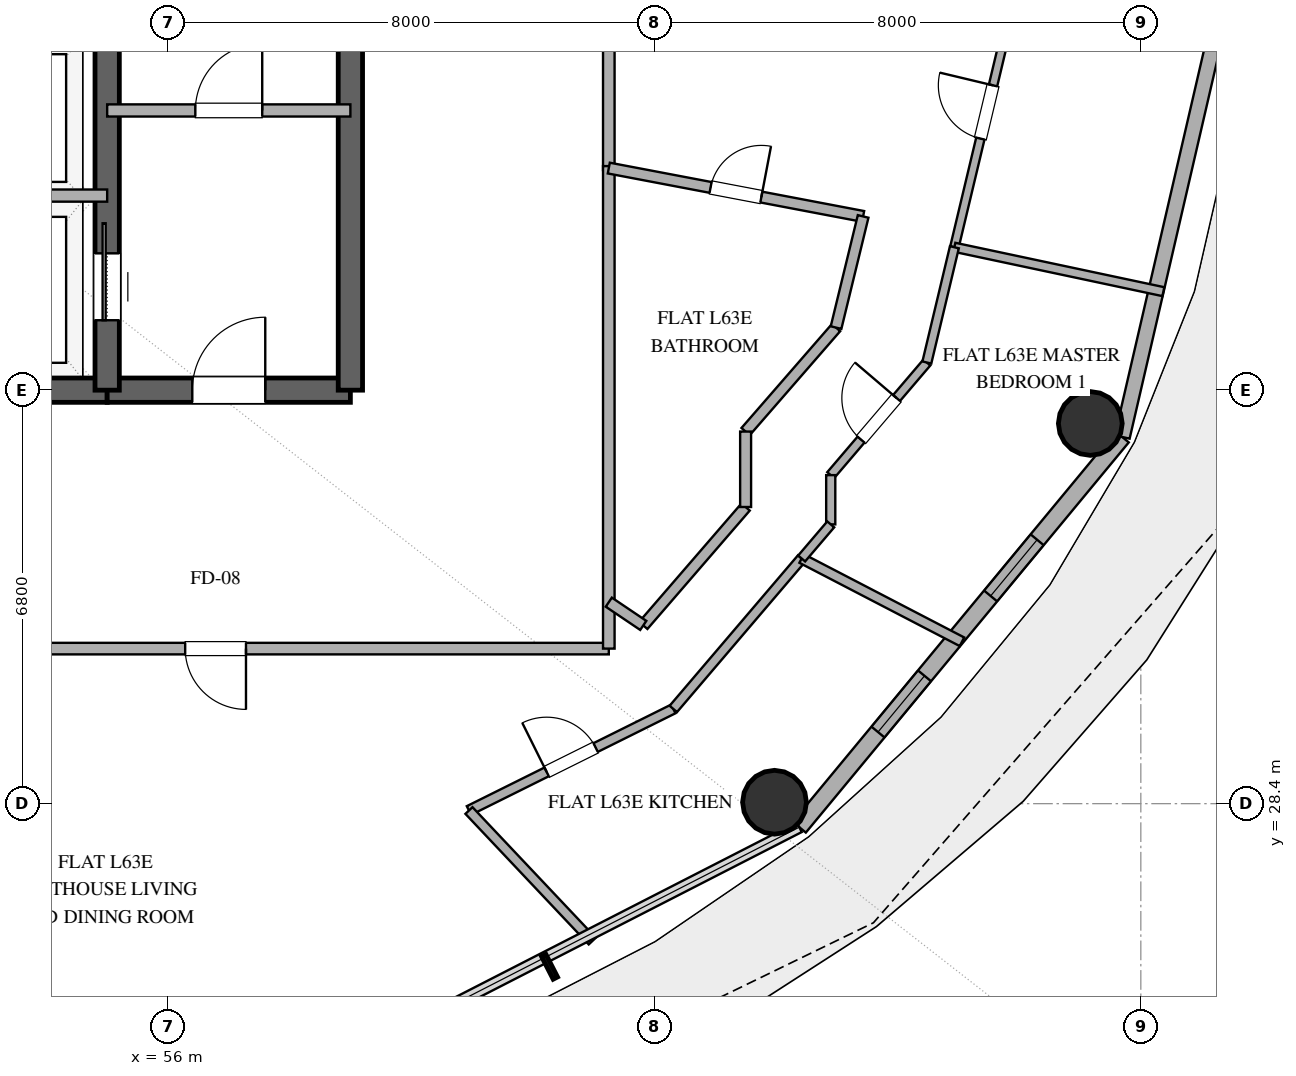
"""IFC4 building model, lengths in metres.
Left out: names, types, materials, properties, quantities, classifications, styles, units other than length and angle.
Written with IfcOpenShell. Run it as: python <this file> out.ifc"""

import sys

from ifc_helpers import new_model, si_unit, direction, frame, frame_2d, origin, origin_2d, place, context, subcontext, project, spatial, rectangle, hollow_circle, extrude, element, fill, save


model = new_model("IFC4")
c1 = context("Model", 3, precision=1e-05, world=origin(), true_north=direction((0.0, 1.0)))
c2 = subcontext(c1, "Body", "Model", "MODEL_VIEW")
j1 = project(units=[si_unit("LENGTHUNIT", "METRE"), si_unit("PLANEANGLEUNIT", "RADIAN")], contexts=[c1])
p1 = place(None, origin())
s1 = spatial("IfcSite", under=j1, at=p1, CompositionType="ELEMENT")
p2 = place(p1, origin())
s2 = spatial("IfcBuilding", under=s1, at=p2, CompositionType="ELEMENT")
p3 = place(p2, frame((0.0, 0.0, 246.0)))
s3 = spatial("IfcBuildingStorey", under=s2, at=p3, CompositionType="ELEMENT", Elevation=246.0)
p4 = place(p3, frame((41.0, 35.2, 0.0), z_axis=(0.0, 0.0, 1.0), x_axis=(1.0, 0.0, 0.0)))
e1 = element("IfcWall", 1, at=p4, inside=s3, PredefinedType="SHEAR", context=c2, shape_type="SweptSolid", body=[
    extrude(rectangle(XDim=14.0, YDim=0.4, at=frame_2d((7.0, 0.0))), origin(), (0.0, 0.0, 1.0), 3.36),
])
p5 = place(p4, frame((6.1, 0.0, 0.0)))
e2 = element("IfcOpeningElement", 2, at=p5, cuts=e1, PredefinedType="OPENING", context=c2, shape_type="SweptSolid", body=[
    extrude(rectangle(XDim=1.8, YDim=2.25, at=frame_2d((0.9, 1.125))), frame((0.0, 0.21, 0.0), z_axis=(0.0, -1.0, 0.0), x_axis=(1.0, 0.0, 0.0)), (0.0, 0.0, 1.0), 0.42),
])
p6 = place(p3, frame((55.0, 35.2, 0.0), z_axis=(0.0, 0.0, 1.0), x_axis=(1.0, 0.0, 0.0)))
e3 = element("IfcWall", 3, at=p6, inside=s3, PredefinedType="SHEAR", context=c2, shape_type="SweptSolid", body=[
    extrude(rectangle(XDim=4.0, YDim=0.4, at=frame_2d((2.0, 0.0))), origin(), (0.0, 0.0, 1.0), 3.36),
])
p7 = place(p6, frame((1.4, 0.0, 0.0)))
e4 = element("IfcOpeningElement", 4, at=p7, cuts=e3, PredefinedType="OPENING", context=c2, shape_type="SweptSolid", body=[
    extrude(rectangle(XDim=1.2, YDim=2.15, at=frame_2d((0.6, 1.075))), frame((0.0, 0.21, 0.0), z_axis=(0.0, -1.0, 0.0), x_axis=(1.0, 0.0, 0.0)), (0.0, 0.0, 1.0), 0.42),
])
p8 = place(p3, frame((59.0, 35.2, 0.0), z_axis=(0.0, 0.0, 1.0), x_axis=(0.0, 1.0, 0.0)))
e5 = element("IfcWall", 5, at=p8, inside=s3, PredefinedType="SHEAR", context=c2, shape_type="SweptSolid", body=[
    extrude(rectangle(XDim=13.6, YDim=0.4, at=frame_2d((6.8, 0.0))), origin(), (0.0, 0.0, 1.0), 3.36),
])
p9 = place(p3, frame((55.0, 35.2, 0.0), z_axis=(0.0, 0.0, 1.0), x_axis=(0.0, 1.0, 0.0)))
e6 = element("IfcWall", 6, at=p9, inside=s3, PredefinedType="SHEAR", context=c2, shape_type="SweptSolid", body=[
    extrude(rectangle(XDim=13.6, YDim=0.4, at=frame_2d((6.8, 0.0))), origin(), (0.0, 0.0, 1.0), 3.36),
])
p10 = place(p9, frame((1.15, 0.0, 0.0)))
e7 = element("IfcOpeningElement", 7, at=p10, cuts=e6, PredefinedType="OPENING", context=c2, shape_type="SweptSolid", body=[
    extrude(rectangle(XDim=1.1, YDim=2.2, at=frame_2d((0.55, 1.1))), frame((0.0, 0.21, 0.0), z_axis=(0.0, -1.0, 0.0), x_axis=(1.0, 0.0, 0.0)), (0.0, 0.0, 1.0), 0.42),
])
for number, where, z_axis, x_axis in (
    (8, (65.975, 28.424, 0.0), (0.0, 0.0, 1.0), (1.0, 0.0, 0.0)),
    (9, (71.169, 34.653, 0.0), (0.0, 0.0, 1.0), (1.0, 0.0, 0.0)),
):
    element("IfcColumn", number, at=place(p3, frame(where, z_axis=z_axis, x_axis=x_axis)), inside=s3, PredefinedType="COLUMN", context=c2, shape_type="SweptSolid", body=[
        extrude(hollow_circle(Radius=0.525, WallThickness=0.028, at=origin_2d()), origin(), (0.0, 0.0, 1.0), 3.36),
    ])
p11 = place(p3, frame((66.383, 28.013, 0.0), z_axis=(0.0, 0.0, 1.0), x_axis=(0.63761509934, 0.770355103243, 0.0)))
e10 = element("IfcWall", 10, at=p11, inside=s3, PredefinedType="SOLIDWALL", context=c2, shape_type="SweptSolid", body=[
    extrude(rectangle(XDim=8.33, YDim=0.28, at=frame_2d((4.165, 0.0))), origin(), (0.0, 0.0, 1.0), 3.36),
])
p12 = place(p11, frame((2.031, 0.0, 0.85)))
e11 = element("IfcOpeningElement", 11, at=p12, cuts=e10, PredefinedType="OPENING", context=c2, shape_type="SweptSolid", body=[
    extrude(rectangle(XDim=1.2, YDim=1.8, at=frame_2d((0.6, 0.9))), frame((0.0, 0.15, 0.0), z_axis=(0.0, -1.0, 0.0), x_axis=(1.0, 0.0, 0.0)), (0.0, 0.0, 1.0), 0.3),
])
p13 = place(p11, frame((4.936, 0.0, 0.85)))
e12 = element("IfcOpeningElement", 12, at=p13, cuts=e10, PredefinedType="OPENING", context=c2, shape_type="SweptSolid", body=[
    extrude(rectangle(XDim=1.2, YDim=1.6, at=frame_2d((0.6, 0.8))), frame((0.0, 0.15, 0.0), z_axis=(0.0, -1.0, 0.0), x_axis=(1.0, 0.0, 0.0)), (0.0, 0.0, 1.0), 0.3),
])
p14 = place(p3, frame((71.694, 34.43, 0.0), z_axis=(0.0, 0.0, 1.0), x_axis=(0.225635078214, 0.974211892495, 0.0)))
e13 = element("IfcWall", 13, at=p14, inside=s3, PredefinedType="SOLIDWALL", context=c2, shape_type="SweptSolid", body=[
    extrude(rectangle(XDim=7.77, YDim=0.25, at=frame_2d((3.885, 0.0))), origin(), (0.0, 0.0, 1.0), 3.36),
])
p15 = place(p3, frame((55.0, 39.8, 0.0), z_axis=(0.0, 0.0, 1.0), x_axis=(1.0, 0.0, 0.0)))
e14 = element("IfcWall", 14, at=p15, inside=s3, PredefinedType="SOLIDWALL", context=c2, shape_type="SweptSolid", body=[
    extrude(rectangle(XDim=4.0, YDim=0.2, at=frame_2d((2.0, 0.0))), origin(), (0.0, 0.0, 1.0), 2.72),
])
p16 = place(p15, frame((1.45, 0.0, 0.0)))
e15 = element("IfcOpeningElement", 15, at=p16, cuts=e14, PredefinedType="OPENING", context=c2, shape_type="SweptSolid", body=[
    extrude(rectangle(XDim=1.1, YDim=2.15, at=frame_2d((0.55, 1.075))), frame((0.0, 0.11, 0.0), z_axis=(0.0, -1.0, 0.0), x_axis=(1.0, 0.0, 0.0)), (0.0, 0.0, 1.0), 0.22),
])
p17 = place(p3, frame((52.05, 38.4, 0.0), z_axis=(0.0, 0.0, 1.0), x_axis=(1.0, 0.0, 0.0)))
e16 = element("IfcWall", 16, at=p17, inside=s3, PredefinedType="SOLIDWALL", context=c2, shape_type="SweptSolid", body=[
    extrude(rectangle(XDim=2.95, YDim=0.2, at=frame_2d((1.475, 0.0))), origin(), (0.0, 0.0, 1.0), 2.72),
])
p18 = place(p3, frame((63.25, 30.95, 0.0), z_axis=(0.0, 0.0, 1.0), x_axis=(-1.0, 0.0, 0.0)))
e17 = element("IfcWall", 17, at=p18, inside=s3, PredefinedType="PARTITIONING", context=c2, shape_type="SweptSolid", body=[
    extrude(rectangle(XDim=14.17, YDim=0.19, at=frame_2d((7.085, 0.0))), origin(), (0.0, 0.0, 1.0), 2.72),
])
p19 = place(p18, frame((5.967, 0.0, 0.0)))
e18 = element("IfcOpeningElement", 18, at=p19, cuts=e17, PredefinedType="OPENING", context=c2, shape_type="SweptSolid", body=[
    extrude(rectangle(XDim=1.0, YDim=2.2, at=frame_2d((0.5, 1.1))), frame((0.0, 0.105, 0.0), z_axis=(0.0, -1.0, 0.0), x_axis=(1.0, 0.0, 0.0)), (0.0, 0.0, 1.0), 0.21),
])
p20 = place(p3, frame((63.25, 53.05, 0.0), z_axis=(0.0, 0.0, 1.0), x_axis=(0.0, -1.0, 0.0)))
e19 = element("IfcWall", 19, at=p20, inside=s3, PredefinedType="PARTITIONING", context=c2, shape_type="SweptSolid", body=[
    extrude(rectangle(XDim=14.23, YDim=0.19, at=frame_2d((7.115, 0.0))), origin(), (0.0, 0.0, 1.0), 2.72),
])
p21 = place(p20, frame((3.697, 0.0, 0.0)))
e20 = element("IfcOpeningElement", 20, at=p21, cuts=e19, PredefinedType="OPENING", context=c2, shape_type="SweptSolid", body=[
    extrude(rectangle(XDim=1.0, YDim=2.2, at=frame_2d((0.5, 1.1))), frame((0.0, 0.105, 0.0), z_axis=(0.0, -1.0, 0.0), x_axis=(1.0, 0.0, 0.0)), (0.0, 0.0, 1.0), 0.21),
])
p22 = place(p3, frame((63.25, 38.885, 0.0), z_axis=(0.0, 0.0, 1.0), x_axis=(0.0, -1.0, 0.0)))
e21 = element("IfcWall", 21, at=p22, inside=s3, PredefinedType="PARTITIONING", context=c2, shape_type="SweptSolid", body=[
    extrude(rectangle(XDim=7.935, YDim=0.19, at=frame_2d((3.968, 0.0))), origin(), (0.0, 0.0, 1.0), 2.72),
])
p23 = place(p3, frame((68.934, 37.55, 0.0), z_axis=(0.0, 0.0, 1.0), x_axis=(0.232301055554, 0.972643932582, 0.0)))
e22 = element("IfcWall", 22, at=p23, inside=s3, PredefinedType="PARTITIONING", context=c2, shape_type="SweptSolid", body=[
    extrude(rectangle(XDim=4.575, YDim=0.14, at=frame_2d((2.288, 0.0))), origin(), (0.0, 0.0, 1.0), 2.72),
])
p24 = place(p23, frame((1.837, 0.0, 0.0)))
e23 = element("IfcOpeningElement", 23, at=p24, cuts=e22, PredefinedType="OPENING", context=c2, shape_type="SweptSolid", body=[
    extrude(rectangle(XDim=0.9, YDim=2.1, at=frame_2d((0.45, 1.05))), frame((0.0, 0.08, 0.0), z_axis=(0.0, -1.0, 0.0), x_axis=(1.0, 0.0, 0.0)), (0.0, 0.0, 1.0), 0.16),
])
p25 = place(p3, frame((63.25, 38.852, 0.0), z_axis=(0.0, 0.0, 1.0), x_axis=(0.982414775925, -0.186711563764, 0.0)))
e24 = element("IfcWall", 24, at=p25, inside=s3, PredefinedType="PLUMBINGWALL", context=c2, shape_type="SweptSolid", body=[
    extrude(rectangle(XDim=4.258, YDim=0.18, at=frame_2d((2.129, 0.0))), origin(), (0.0, 0.0, 1.0), 2.72),
])
p26 = place(p25, frame((1.704, 0.0, 0.0)))
e25 = element("IfcOpeningElement", 25, at=p26, cuts=e24, PredefinedType="OPENING", context=c2, shape_type="SweptSolid", body=[
    extrude(rectangle(XDim=0.85, YDim=2.1, at=frame_2d((0.425, 1.05))), frame((0.0, 0.1, 0.0), z_axis=(0.0, -1.0, 0.0), x_axis=(1.0, 0.0, 0.0)), (0.0, 0.0, 1.0), 0.2),
])
p27 = place(p3, frame((60.95, 28.287, 0.0), z_axis=(0.0, 0.0, 1.0), x_axis=(0.895465553998, 0.445130814035, 0.0)))
e26 = element("IfcWall", 26, at=p27, inside=s3, PredefinedType="PLUMBINGWALL", context=c2, shape_type="SweptSolid", body=[
    extrude(rectangle(XDim=3.753, YDim=0.16, at=frame_2d((1.876, 0.0))), origin(), (0.0, 0.0, 1.0), 2.72),
])
p28 = place(p27, frame((1.427, 0.0, 0.0)))
e27 = element("IfcOpeningElement", 27, at=p28, cuts=e26, PredefinedType="OPENING", context=c2, shape_type="SweptSolid", body=[
    extrude(rectangle(XDim=0.9, YDim=2.1, at=frame_2d((0.45, 1.05))), frame((0.0, 0.09, 0.0), z_axis=(0.0, -1.0, 0.0), x_axis=(1.0, 0.0, 0.0)), (0.0, 0.0, 1.0), 0.18),
])
p29 = place(p3, frame((72.37, 36.82, 0.0), z_axis=(0.0, 0.0, 1.0), x_axis=(-0.978163972004, 0.20783465513, 0.0)))
e28 = element("IfcWall", 28, at=p29, inside=s3, PredefinedType="PARTITIONING", context=c2, shape_type="SweptSolid", body=[
    extrude(rectangle(XDim=3.513, YDim=0.15, at=frame_2d((1.757, 0.0))), origin(), (0.0, 0.0, 1.0), 2.72),
])
p30 = place(p3, frame((64.311, 29.958, 0.0), z_axis=(0.0, 0.0, 1.0), x_axis=(0.648959388132, 0.760823049437, 0.0)))
e29 = element("IfcWall", 29, at=p30, inside=s3, PredefinedType="PLUMBINGWALL", context=c2, shape_type="SweptSolid", body=[
    extrude(rectangle(XDim=3.252, YDim=0.16, at=frame_2d((1.626, 0.0))), origin(), (0.0, 0.0, 1.0), 2.72),
])
p31 = place(p3, frame((69.058, 31.062, 0.0), z_axis=(0.0, 0.0, 1.0), x_axis=(-0.887435973199, 0.460931007281, 0.0)))
e30 = element("IfcWall", 30, at=p31, inside=s3, PredefinedType="PLUMBINGWALL", context=c2, shape_type="SweptSolid", body=[
    extrude(rectangle(XDim=2.971, YDim=0.16, at=frame_2d((1.486, 0.0))), origin(), (0.0, 0.0, 1.0), 2.72),
])
p32 = place(p3, frame((62.978, 26.14, 0.0), z_axis=(0.0, 0.0, 1.0), x_axis=(-0.686565278446, 0.72706816629, 0.0)))
e31 = element("IfcWall", 31, at=p32, inside=s3, PredefinedType="PLUMBINGWALL", context=c2, shape_type="SweptSolid", body=[
    extrude(rectangle(XDim=2.954, YDim=0.16, at=frame_2d((1.477, 0.0))), origin(), (0.0, 0.0, 1.0), 2.72),
])
p33 = place(p3, frame((65.5, 33.279, 0.0), z_axis=(0.0, 0.0, 1.0), x_axis=(-0.653879119416, -0.756599033301, 0.0)))
e32 = element("IfcWall", 32, at=p33, inside=s3, PredefinedType="PLUMBINGWALL", context=c2, shape_type="SweptSolid", body=[
    extrude(rectangle(XDim=2.574, YDim=0.18, at=frame_2d((1.287, 0.0))), origin(), (0.0, 0.0, 1.0), 2.72),
])
p34 = place(p3, frame((66.9, 33.803, 0.0), z_axis=(0.0, 0.0, 1.0), x_axis=(0.649270866973, 0.760557257082, 0.0)))
e33 = element("IfcWall", 33, at=p34, inside=s3, PredefinedType="PARTITIONING", context=c2, shape_type="SweptSolid", body=[
    extrude(rectangle(XDim=2.435, YDim=0.15, at=frame_2d((1.218, 0.0))), origin(), (0.0, 0.0, 1.0), 2.72),
])
p35 = place(p34, frame((0.768, 0.0, 0.0)))
e34 = element("IfcOpeningElement", 34, at=p35, cuts=e33, PredefinedType="OPENING", context=c2, shape_type="SweptSolid", body=[
    extrude(rectangle(XDim=0.9, YDim=2.1, at=frame_2d((0.45, 1.05))), frame((0.0, 0.085, 0.0), z_axis=(0.0, -1.0, 0.0), x_axis=(1.0, 0.0, 0.0)), (0.0, 0.0, 1.0), 0.17),
])
p36 = place(p3, frame((66.988, 36.229, 0.0), z_axis=(0.0, 0.0, 1.0), x_axis=(-0.656389391797, -0.754422273224, 0.0)))
e35 = element("IfcWall", 35, at=p36, inside=s3, PredefinedType="PLUMBINGWALL", context=c2, shape_type="SweptSolid", body=[
    extrude(rectangle(XDim=2.266, YDim=0.18, at=frame_2d((1.133, 0.0))), origin(), (0.0, 0.0, 1.0), 2.72),
])
p37 = place(p3, frame((68.481, 35.655, 0.0), z_axis=(0.0, 0.0, 1.0), x_axis=(0.232292373483, 0.97264600612, 0.0)))
e36 = element("IfcWall", 36, at=p37, inside=s3, PredefinedType="PARTITIONING", context=c2, shape_type="SweptSolid", body=[
    extrude(rectangle(XDim=1.948, YDim=0.15, at=frame_2d((0.974, 0.0))), origin(), (0.0, 0.0, 1.0), 2.72),
])
p38 = place(p3, frame((67.433, 38.057, 0.0), z_axis=(0.0, 0.0, 1.0), x_axis=(-0.236517106823, -0.971627324739, 0.0)))
e37 = element("IfcWall", 37, at=p38, inside=s3, PredefinedType="PLUMBINGWALL", context=c2, shape_type="SweptSolid", body=[
    extrude(rectangle(XDim=1.882, YDim=0.18, at=frame_2d((0.941, 0.0))), origin(), (0.0, 0.0, 1.0), 2.72),
])
p39 = place(p3, frame((65.5, 34.519, 0.0), z_axis=(0.0, 0.0, 1.0), x_axis=(0.0, -1.0, 0.0)))
e38 = element("IfcWall", 38, at=p39, inside=s3, PredefinedType="PLUMBINGWALL", context=c2, shape_type="SweptSolid", body=[
    extrude(rectangle(XDim=1.24, YDim=0.18, at=frame_2d((0.62, 0.0))), origin(), (0.0, 0.0, 1.0), 2.72),
])
p40 = place(p3, frame((66.9, 32.993, 0.0), z_axis=(0.0, 0.0, 1.0), x_axis=(0.0, 1.0, 0.0)))
e39 = element("IfcWall", 39, at=p40, inside=s3, PredefinedType="PARTITIONING", context=c2, shape_type="SweptSolid", body=[
    extrude(rectangle(XDim=0.81, YDim=0.15, at=frame_2d((0.405, 0.0))), origin(), (0.0, 0.0, 1.0), 2.72),
])
p41 = place(p3, frame((66.421, 32.432, 0.0), z_axis=(0.0, 0.0, 1.0), x_axis=(0.649098829795, 0.760704087775, 0.0)))
e40 = element("IfcWall", 40, at=p41, inside=s3, PredefinedType="PARTITIONING", context=c2, shape_type="SweptSolid", body=[
    extrude(rectangle(XDim=0.737, YDim=0.15, at=frame_2d((0.369, 0.0))), origin(), (0.0, 0.0, 1.0), 2.72),
])
p42 = place(p3, frame((63.817, 31.331, 0.0), z_axis=(0.0, 0.0, 1.0), x_axis=(-0.829072128826, 0.559141668278, 0.0)))
e41 = element("IfcWall", 41, at=p42, inside=s3, PredefinedType="PLUMBINGWALL", context=c2, shape_type="SweptSolid", body=[
    extrude(rectangle(XDim=0.684, YDim=0.18, at=frame_2d((0.342, 0.0))), origin(), (0.0, 0.0, 1.0), 2.72),
])
p43 = place(p12, origin())
e42 = element("IfcWindow", 42, at=p43, inside=s3, PartitioningType="SINGLE_PANEL", PredefinedType="WINDOW", context=c2, shape_type="SweptSolid", body=[
    extrude(rectangle(XDim=1.2, YDim=1.8, at=frame_2d((0.6, 0.9))), frame((0.0, 0.03, 0.0), z_axis=(0.0, -1.0, 0.0), x_axis=(1.0, 0.0, 0.0)), (0.0, 0.0, 1.0), 0.06),
])
fill(e11, e42)
p44 = place(p13, origin())
e43 = element("IfcWindow", 43, at=p44, inside=s3, PartitioningType="SINGLE_PANEL", PredefinedType="WINDOW", context=c2, shape_type="SweptSolid", body=[
    extrude(rectangle(XDim=1.2, YDim=1.6, at=frame_2d((0.6, 0.8))), frame((0.0, 0.03, 0.0), z_axis=(0.0, -1.0, 0.0), x_axis=(1.0, 0.0, 0.0)), (0.0, 0.0, 1.0), 0.06),
])
fill(e12, e43)
p45 = place(p10, origin())
e44 = element("IfcDoor", 44, at=p45, inside=s3, OperationType="SLIDING_TO_RIGHT", PredefinedType="DOOR", context=c2, shape_type="SweptSolid", body=[
    extrude(rectangle(XDim=1.1, YDim=2.2, at=frame_2d((0.55, 1.1))), frame((0.0, 0.025, 0.0), z_axis=(0.0, -1.0, 0.0), x_axis=(1.0, 0.0, 0.0)), (0.0, 0.0, 1.0), 0.05),
])
fill(e7, e44)
p46 = place(p7, origin())
e45 = element("IfcDoor", 45, at=p46, inside=s3, OperationType="SINGLE_SWING_RIGHT", PredefinedType="DOOR", context=c2, shape_type="SweptSolid", body=[
    extrude(rectangle(XDim=1.2, YDim=2.15, at=frame_2d((0.6, 1.075))), frame((0.0, 0.025, 0.0), z_axis=(0.0, -1.0, 0.0), x_axis=(1.0, 0.0, 0.0)), (0.0, 0.0, 1.0), 0.05),
])
fill(e4, e45)
p47 = place(p16, origin())
e46 = element("IfcDoor", 46, at=p47, inside=s3, OperationType="SINGLE_SWING_RIGHT", PredefinedType="DOOR", context=c2, shape_type="SweptSolid", body=[
    extrude(rectangle(XDim=1.1, YDim=2.15, at=frame_2d((0.55, 1.075))), frame((0.0, 0.025, 0.0), z_axis=(0.0, -1.0, 0.0), x_axis=(1.0, 0.0, 0.0)), (0.0, 0.0, 1.0), 0.05),
])
fill(e15, e46)
p48 = place(p19, origin())
e47 = element("IfcDoor", 47, at=p48, inside=s3, OperationType="SINGLE_SWING_LEFT", PredefinedType="DOOR", context=c2, shape_type="SweptSolid", body=[
    extrude(rectangle(XDim=1.0, YDim=2.2, at=frame_2d((0.5, 1.1))), frame((0.0, 0.025, 0.0), z_axis=(0.0, -1.0, 0.0), x_axis=(1.0, 0.0, 0.0)), (0.0, 0.0, 1.0), 0.05),
])
fill(e18, e47)
p49 = place(p24, origin())
e48 = element("IfcDoor", 48, at=p49, inside=s3, OperationType="SINGLE_SWING_RIGHT", PredefinedType="DOOR", context=c2, shape_type="SweptSolid", body=[
    extrude(rectangle(XDim=0.9, YDim=2.1, at=frame_2d((0.45, 1.05))), frame((0.0, 0.025, 0.0), z_axis=(0.0, -1.0, 0.0), x_axis=(1.0, 0.0, 0.0)), (0.0, 0.0, 1.0), 0.05),
])
fill(e23, e48)
p50 = place(p26, origin())
e49 = element("IfcDoor", 49, at=p50, inside=s3, OperationType="SINGLE_SWING_RIGHT", PredefinedType="DOOR", context=c2, shape_type="SweptSolid", body=[
    extrude(rectangle(XDim=0.85, YDim=2.1, at=frame_2d((0.425, 1.05))), frame((0.0, 0.025, 0.0), z_axis=(0.0, -1.0, 0.0), x_axis=(1.0, 0.0, 0.0)), (0.0, 0.0, 1.0), 0.05),
])
fill(e25, e49)
p51 = place(p28, origin())
e50 = element("IfcDoor", 50, at=p51, inside=s3, OperationType="SINGLE_SWING_LEFT", PredefinedType="DOOR", context=c2, shape_type="SweptSolid", body=[
    extrude(rectangle(XDim=0.9, YDim=2.1, at=frame_2d((0.45, 1.05))), frame((0.0, 0.025, 0.0), z_axis=(0.0, -1.0, 0.0), x_axis=(1.0, 0.0, 0.0)), (0.0, 0.0, 1.0), 0.05),
])
fill(e27, e50)
p52 = place(p35, origin())
e51 = element("IfcDoor", 51, at=p52, inside=s3, OperationType="SINGLE_SWING_RIGHT", PredefinedType="DOOR", context=c2, shape_type="SweptSolid", body=[
    extrude(rectangle(XDim=0.9, YDim=2.1, at=frame_2d((0.45, 1.05))), frame((0.0, 0.025, 0.0), z_axis=(0.0, -1.0, 0.0), x_axis=(1.0, 0.0, 0.0)), (0.0, 0.0, 1.0), 0.05),
])
fill(e34, e51)
save(model, sys.argv[1])
